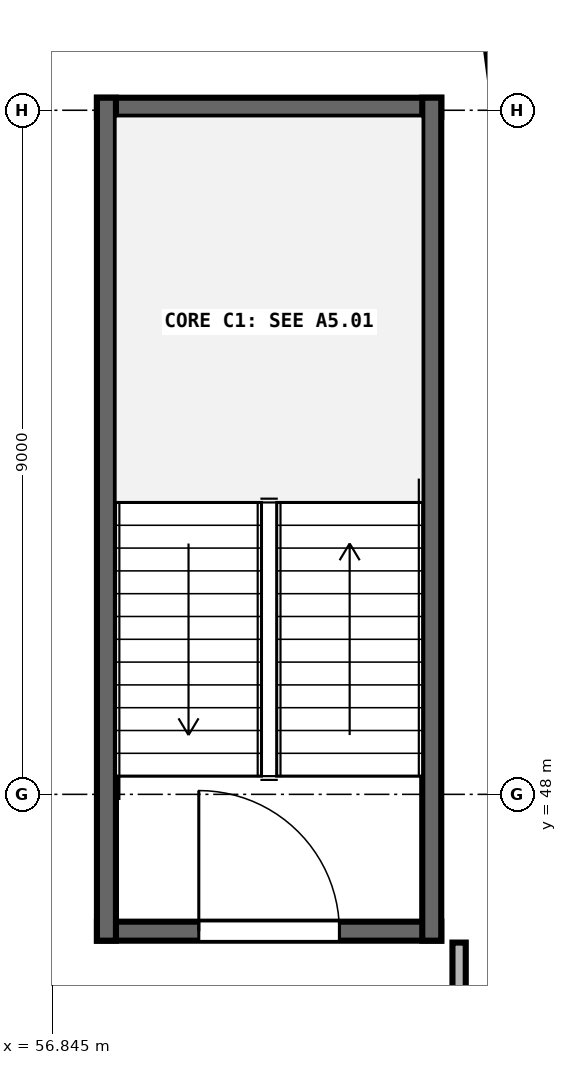
"""IFC4 building model, lengths in metres.
Left out: names, types, materials, properties, quantities, classifications, styles, units other than length and angle.
Written with IfcOpenShell. Run it as: python <this file> out.ifc"""

import sys

from ifc_helpers import new_model, si_unit, direction, frame, frame_2d, origin, place, context, subcontext, project, spatial, rectangle, extrude, element, fill, save


model = new_model("IFC4")
c1 = context("Model", 3, precision=1e-05, world=origin(), true_north=direction((0.0, 1.0)))
c2 = subcontext(c1, "Body", "Model", "MODEL_VIEW")
j1 = project(units=[si_unit("LENGTHUNIT", "METRE"), si_unit("PLANEANGLEUNIT", "RADIAN")], contexts=[c1])
p1 = place(None, origin())
s1 = spatial("IfcSite", under=j1, at=p1, CompositionType="ELEMENT")
p2 = place(p1, origin())
s2 = spatial("IfcBuilding", under=s1, at=p2, CompositionType="ELEMENT")
p3 = place(p2, frame((0.0, 0.0, 10.2)))
s3 = spatial("IfcBuildingStorey", under=s2, at=p3, CompositionType="ELEMENT", Elevation=10.2)
p4 = place(p3, frame((62.4, 60.5, 0.0), z_axis=(0.0, 0.0, 1.0), x_axis=(0.130591512704, -0.99143625958, 0.0)))
e1 = element("IfcWall", 1, at=p4, inside=s3, PredefinedType="SHEAR", context=c2, shape_type="SweptSolid", body=[
    extrude(rectangle(XDim=5.117, YDim=0.4, at=frame_2d((2.558, 0.0))), origin(), (0.0, 0.0, 1.0), 4.24),
])
p5 = place(p3, frame((57.435, 46.2, 0.0), z_axis=(0.0, 0.0, 1.0), x_axis=(1.0, 0.0, 0.0)))
e2 = element("IfcWall", 2, at=p5, inside=s3, PredefinedType="SHEAR", context=c2, shape_type="SweptSolid", body=[
    extrude(rectangle(XDim=4.53, YDim=0.25, at=frame_2d((2.265, 0.0))), origin(), (0.0, 0.0, 1.0), 4.24),
])
p6 = place(p5, frame((1.34, 0.0, 0.0)))
e3 = element("IfcOpeningElement", 3, at=p6, cuts=e2, PredefinedType="OPENING", context=c2, shape_type="SweptSolid", body=[
    extrude(rectangle(XDim=1.85, YDim=2.25, at=frame_2d((0.925, 1.125))), frame((0.0, 0.135, 0.0), z_axis=(0.0, -1.0, 0.0), x_axis=(1.0, 0.0, 0.0)), (0.0, 0.0, 1.0), 0.27),
])
p7 = place(p3, frame((57.435, 57.04, 0.0), z_axis=(0.0, 0.0, 1.0), x_axis=(1.0, 0.0, 0.0)))
e4 = element("IfcWall", 4, at=p7, inside=s3, PredefinedType="SHEAR", context=c2, shape_type="SweptSolid", body=[
    extrude(rectangle(XDim=4.53, YDim=0.25, at=frame_2d((2.265, 0.0))), origin(), (0.0, 0.0, 1.0), 4.24),
])
for number, where, z_axis, x_axis in (
    (5, (57.56, 46.075, 0.0), (0.0, 0.0, 1.0), (0.0, 1.0, 0.0)),
    (6, (61.84, 46.075, 0.0), (0.0, 0.0, 1.0), (0.0, 1.0, 0.0)),
):
    element("IfcWall", number, at=place(p3, frame(where, z_axis=z_axis, x_axis=x_axis)), inside=s3, PredefinedType="SHEAR", context=c2, shape_type="SweptSolid", body=[
        extrude(rectangle(XDim=11.09, YDim=0.25, at=frame_2d((5.545, 0.0))), origin(), (0.0, 0.0, 1.0), 4.24),
    ])
p8 = place(p3, frame((62.2, 40.95, 0.0), z_axis=(0.0, 0.0, 1.0), x_axis=(0.0, 1.0, 0.0)))
e7 = element("IfcWall", 7, at=p8, inside=s3, PredefinedType="PARTITIONING", context=c2, shape_type="SweptSolid", body=[
    extrude(rectangle(XDim=5.1, YDim=0.175, at=frame_2d((2.55, 0.0))), origin(), (0.0, 0.0, 1.0), 4.19),
])
p9 = place(p8, frame((1.775, 0.0, 0.0)))
e8 = element("IfcOpeningElement", 8, at=p9, cuts=e7, PredefinedType="OPENING", context=c2, shape_type="SweptSolid", body=[
    extrude(rectangle(XDim=1.55, YDim=2.22, at=frame_2d((0.775, 1.11))), frame((0.0, 0.097, 0.0), z_axis=(0.0, -1.0, 0.0), x_axis=(1.0, 0.0, 0.0)), (0.0, 0.0, 1.0), 0.195),
])
p10 = place(p6, origin())
e9 = element("IfcDoor", 9, at=p10, inside=s3, OperationType="SINGLE_SWING_LEFT", PredefinedType="DOOR", context=c2, shape_type="SweptSolid", body=[
    extrude(rectangle(XDim=1.85, YDim=2.25, at=frame_2d((0.925, 1.125))), frame((0.0, 0.025, 0.0), z_axis=(0.0, -1.0, 0.0), x_axis=(1.0, 0.0, 0.0)), (0.0, 0.0, 1.0), 0.05),
])
fill(e3, e9)
save(model, sys.argv[1])
